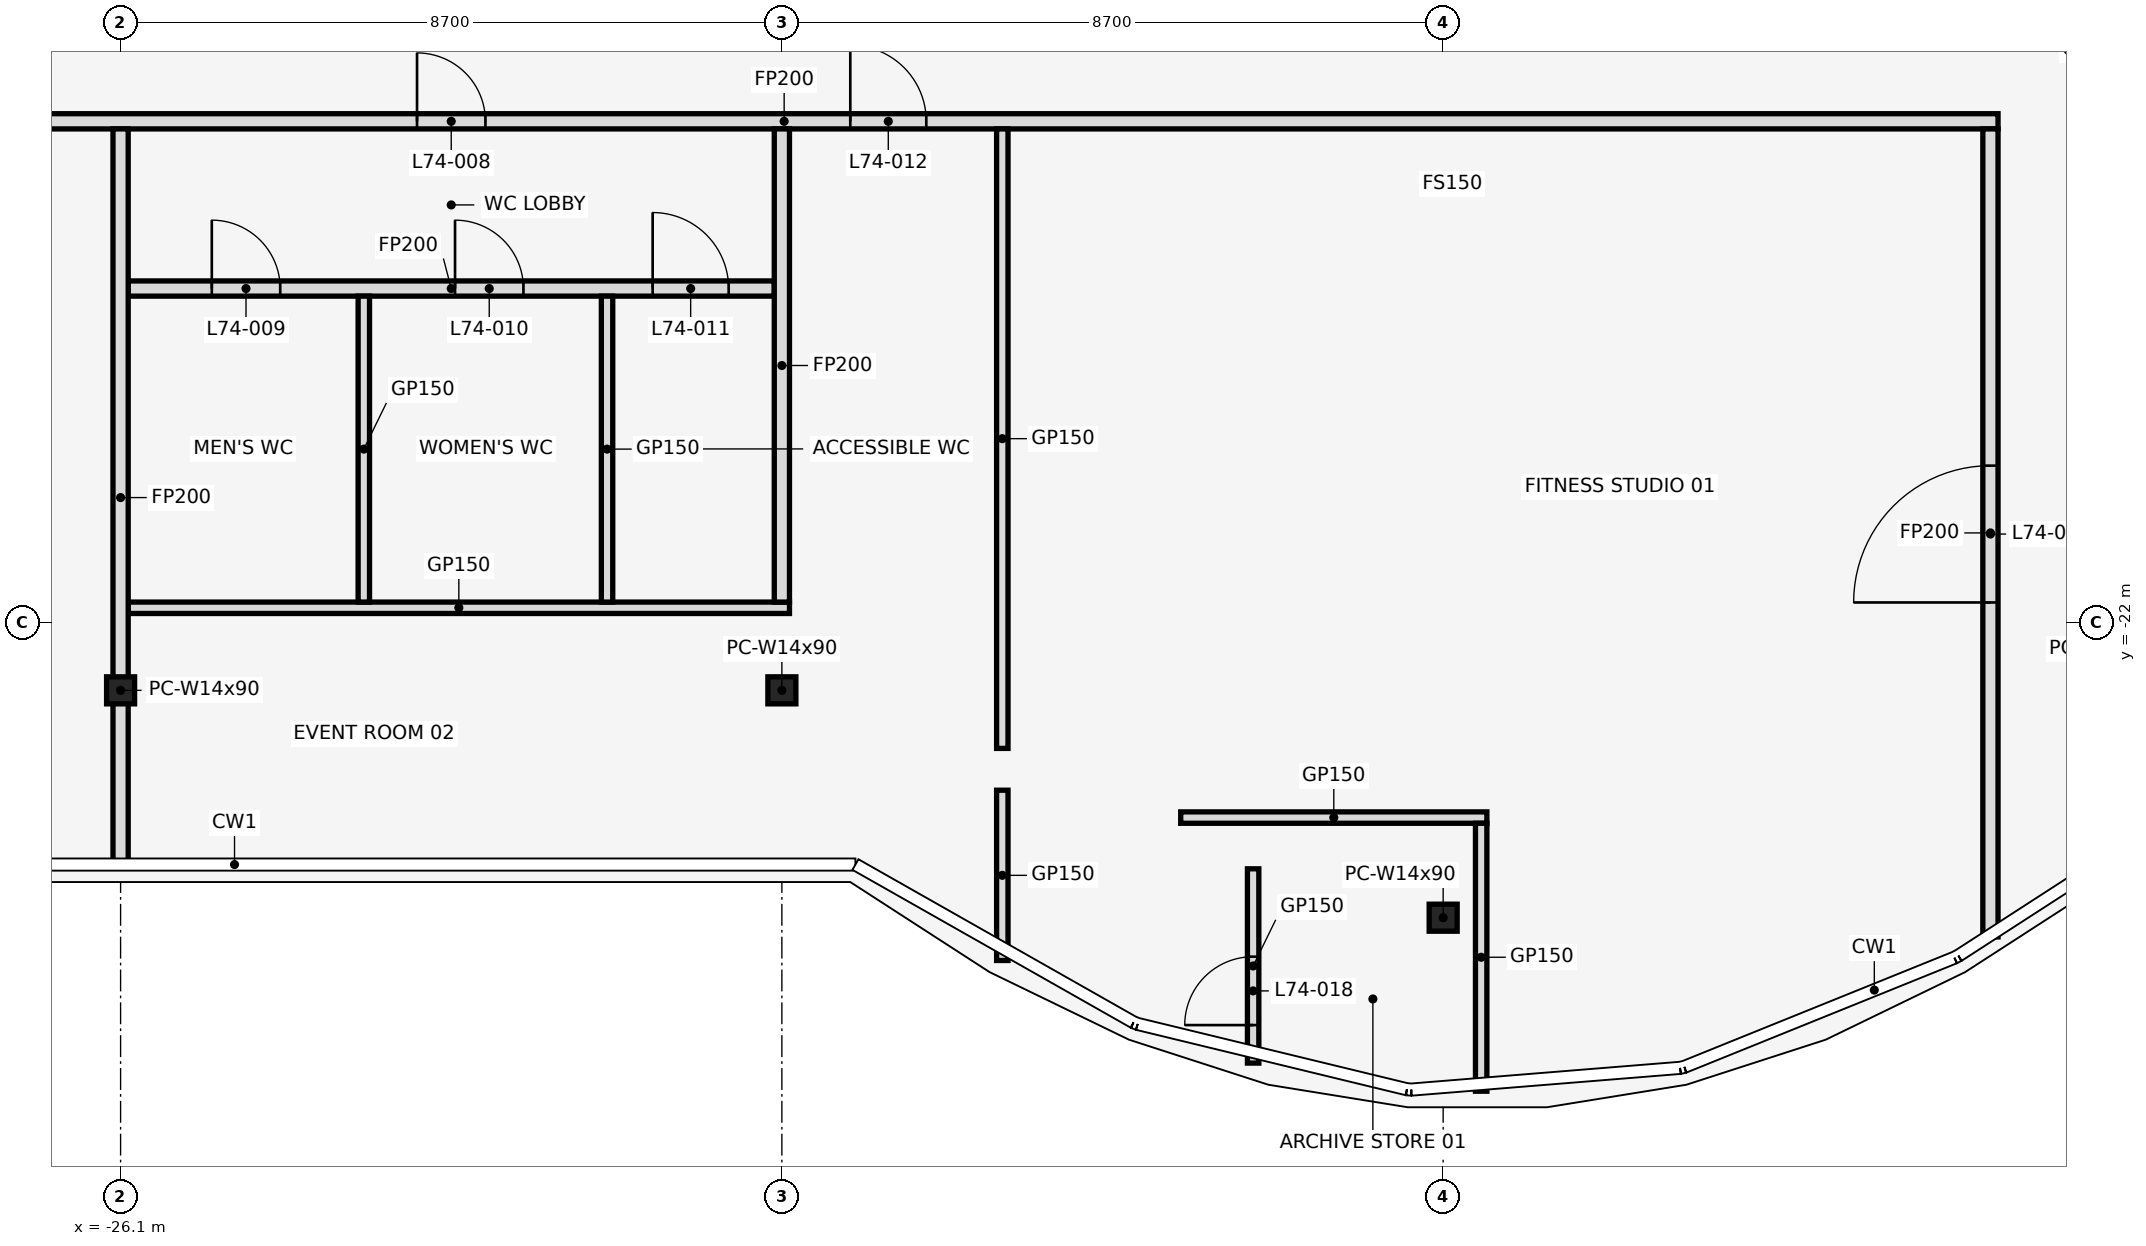
"""IFC4 building model, lengths in metres.
Left out: names, types, materials, properties, quantities, classifications, styles, units other than length and angle.
Written with IfcOpenShell. Run it as: python <this file> out.ifc"""

import sys

from ifc_helpers import new_model, si_unit, direction, frame, frame_2d, origin, origin_2d, place, context, subcontext, project, spatial, rectangle, i_section, extrude, element, fill, save


model = new_model("IFC4")
c1 = context("Model", 3, precision=1e-05, world=origin(), true_north=direction((0.0, 1.0)))
c2 = subcontext(c1, "Body", "Model", "MODEL_VIEW")
j1 = project(units=[si_unit("LENGTHUNIT", "METRE"), si_unit("PLANEANGLEUNIT", "RADIAN")], contexts=[c1])
p1 = place(None, origin())
s1 = spatial("IfcSite", under=j1, at=p1, CompositionType="ELEMENT")
p2 = place(p1, origin())
s2 = spatial("IfcBuilding", under=s1, at=p2, CompositionType="ELEMENT")
p3 = place(p2, frame((0.0, 0.0, 329.0)))
s3 = spatial("IfcBuildingStorey", under=s2, at=p3, CompositionType="ELEMENT", Elevation=329.0)
for number, where, z_axis, x_axis in (
    (1, (-26.1, -22.886, 0.0), (0.0, 0.0, 1.0), (1.0, 0.0, 0.0)),
    (2, (-17.4, -22.886, 0.0), (0.0, 0.0, 1.0), (1.0, 0.0, 0.0)),
    (3, (-8.7, -25.877, 0.0), (0.0, 0.0, 1.0), (1.0, 0.0, 0.0)),
):
    element("IfcColumn", number, at=place(p3, frame(where, z_axis=z_axis, x_axis=x_axis)), inside=s3, PredefinedType="COLUMN", context=c2, shape_type="SweptSolid", body=[
        extrude(i_section(OverallWidth=0.368, OverallDepth=0.356, WebThickness=0.011, FlangeThickness=0.018, at=origin_2d()), origin(), (0.0, 0.0, 1.0), 4.5),
    ])
p4 = place(p3, frame((-12.153, -24.56, 0.0), z_axis=(0.0, 0.0, 1.0), x_axis=(1.0, 0.0, 0.0)))
e4 = element("IfcWall", 4, at=p4, inside=s3, PredefinedType="PARTITIONING", context=c2, shape_type="SweptSolid", body=[
    extrude(rectangle(XDim=4.028, YDim=0.15, at=frame_2d((2.014, 0.0))), origin(), (0.0, 0.0, 1.0), 3.418),
])
p5 = place(p3, frame((-26.0, -21.8, 0.0), z_axis=(0.0, 0.0, 1.0), x_axis=(1.0, 0.0, 0.0)))
e5 = element("IfcWall", 5, at=p5, inside=s3, PredefinedType="PARTITIONING", context=c2, shape_type="SweptSolid", body=[
    extrude(rectangle(XDim=8.7, YDim=0.15, at=frame_2d((4.35, 0.0))), origin(), (0.0, 0.0, 1.0), 3.418),
])
p6 = place(p3, frame((-26.0, -17.6, 0.0), z_axis=(0.0, 0.0, 1.0), x_axis=(1.0, 0.0, 0.0)))
e6 = element("IfcWall", 6, at=p6, inside=s3, PredefinedType="PARTITIONING", context=c2, shape_type="SweptSolid", body=[
    extrude(rectangle(XDim=8.5, YDim=0.2, at=frame_2d((4.25, 0.0))), origin(), (0.0, 0.0, 1.0), 3.418),
])
p7 = place(p6, frame((1.1, 0.0, 0.0)))
e7 = element("IfcOpeningElement", 7, at=p7, cuts=e6, PredefinedType="OPENING", context=c2, shape_type="SweptSolid", body=[
    extrude(rectangle(XDim=0.9, YDim=2.1, at=frame_2d((0.45, 1.05))), frame((0.0, 0.112, 0.0), z_axis=(0.0, -1.0, 0.0), x_axis=(1.0, 0.0, 0.0)), (0.0, 0.0, 1.0), 0.224),
])
p8 = place(p6, frame((4.3, 0.0, 0.0)))
e8 = element("IfcOpeningElement", 8, at=p8, cuts=e6, PredefinedType="OPENING", context=c2, shape_type="SweptSolid", body=[
    extrude(rectangle(XDim=0.9, YDim=2.1, at=frame_2d((0.45, 1.05))), frame((0.0, 0.112, 0.0), z_axis=(0.0, -1.0, 0.0), x_axis=(1.0, 0.0, 0.0)), (0.0, 0.0, 1.0), 0.224),
])
p9 = place(p6, frame((6.9, 0.0, 0.0)))
e9 = element("IfcOpeningElement", 9, at=p9, cuts=e6, PredefinedType="OPENING", context=c2, shape_type="SweptSolid", body=[
    extrude(rectangle(XDim=1.0, YDim=2.1, at=frame_2d((0.5, 1.05))), frame((0.0, 0.112, 0.0), z_axis=(0.0, -1.0, 0.0), x_axis=(1.0, 0.0, 0.0)), (0.0, 0.0, 1.0), 0.224),
])
p10 = place(p3, frame((-33.34, -15.4, 0.0), z_axis=(0.0, 0.0, 1.0), x_axis=(1.0, 0.0, 0.0)))
e10 = element("IfcWall", 10, at=p10, inside=s3, PredefinedType="PARTITIONING", context=c2, shape_type="SweptSolid", body=[
    extrude(rectangle(XDim=31.94, YDim=0.2, at=frame_2d((15.97, 0.0))), origin(), (0.0, 0.0, 1.0), 3.418),
])
p11 = place(p10, frame((3.1, 0.0, 0.0)))
e11 = element("IfcOpeningElement", 11, at=p11, cuts=e10, PredefinedType="OPENING", context=c2, shape_type="SweptSolid", body=[
    extrude(rectangle(XDim=1.0, YDim=2.1, at=frame_2d((0.5, 1.05))), frame((0.0, 0.112, 0.0), z_axis=(0.0, -1.0, 0.0), x_axis=(1.0, 0.0, 0.0)), (0.0, 0.0, 1.0), 0.224),
])
p12 = place(p10, frame((11.14, 0.0, 0.0)))
e12 = element("IfcOpeningElement", 12, at=p12, cuts=e10, PredefinedType="OPENING", context=c2, shape_type="SweptSolid", body=[
    extrude(rectangle(XDim=0.9, YDim=2.1, at=frame_2d((0.45, 1.05))), frame((0.0, 0.112, 0.0), z_axis=(0.0, -1.0, 0.0), x_axis=(1.0, 0.0, 0.0)), (0.0, 0.0, 1.0), 0.224),
])
p13 = place(p10, frame((16.84, 0.0, 0.0)))
e13 = element("IfcOpeningElement", 13, at=p13, cuts=e10, PredefinedType="OPENING", context=c2, shape_type="SweptSolid", body=[
    extrude(rectangle(XDim=1.0, YDim=2.1, at=frame_2d((0.5, 1.05))), frame((0.0, 0.112, 0.0), z_axis=(0.0, -1.0, 0.0), x_axis=(1.0, 0.0, 0.0)), (0.0, 0.0, 1.0), 0.224),
])
p14 = place(p3, frame((-26.1, -25.2, 0.0), z_axis=(0.0, 0.0, 1.0), x_axis=(0.0, 1.0, 0.0)))
e14 = element("IfcWall", 14, at=p14, inside=s3, PredefinedType="PARTITIONING", context=c2, shape_type="SweptSolid", body=[
    extrude(rectangle(XDim=9.7, YDim=0.2, at=frame_2d((4.85, 0.0))), origin(), (0.0, 0.0, 1.0), 3.418),
])
for number, where, z_axis, x_axis in (
    (15, (-22.9, -21.725, 0.0), (0.0, 0.0, 1.0), (0.0, 1.0, 0.0)),
    (16, (-19.7, -21.725, 0.0), (0.0, 0.0, 1.0), (0.0, 1.0, 0.0)),
):
    element("IfcWall", number, at=place(p3, frame(where, z_axis=z_axis, x_axis=x_axis)), inside=s3, PredefinedType="PARTITIONING", context=c2, shape_type="SweptSolid", body=[
        extrude(rectangle(XDim=4.025, YDim=0.15, at=frame_2d((2.013, 0.0))), origin(), (0.0, 0.0, 1.0), 3.418),
    ])
p15 = place(p3, frame((-17.4, -21.725, 0.0), z_axis=(0.0, 0.0, 1.0), x_axis=(0.0, 1.0, 0.0)))
e17 = element("IfcWall", 17, at=p15, inside=s3, PredefinedType="PARTITIONING", context=c2, shape_type="SweptSolid", body=[
    extrude(rectangle(XDim=6.225, YDim=0.2, at=frame_2d((3.113, 0.0))), origin(), (0.0, 0.0, 1.0), 3.418),
])
p16 = place(p3, frame((-14.5, -26.44, 0.0), z_axis=(0.0, 0.0, 1.0), x_axis=(0.0, 1.0, 0.0)))
e18 = element("IfcWall", 18, at=p16, inside=s3, PredefinedType="PARTITIONING", context=c2, shape_type="SweptSolid", body=[
    extrude(rectangle(XDim=2.24, YDim=0.15, at=frame_2d((1.12, 0.0))), origin(), (0.0, 0.0, 1.0), 3.418),
])
p17 = place(p3, frame((-14.5, -23.65, 0.0), z_axis=(0.0, 0.0, 1.0), x_axis=(0.0, 1.0, 0.0)))
e19 = element("IfcWall", 19, at=p17, inside=s3, PredefinedType="PARTITIONING", context=c2, shape_type="SweptSolid", body=[
    extrude(rectangle(XDim=8.15, YDim=0.15, at=frame_2d((4.075, 0.0))), origin(), (0.0, 0.0, 1.0), 3.418),
])
p18 = place(p3, frame((-11.2, -27.79, 0.0), z_axis=(0.0, 0.0, 1.0), x_axis=(0.0, 1.0, 0.0)))
e20 = element("IfcWall", 20, at=p18, inside=s3, PredefinedType="PARTITIONING", context=c2, shape_type="SweptSolid", body=[
    extrude(rectangle(XDim=2.556, YDim=0.15, at=frame_2d((1.278, 0.0))), origin(), (0.0, 0.0, 1.0), 3.418),
])
p19 = place(p18, frame((0.5, 0.0, 0.0)))
e21 = element("IfcOpeningElement", 21, at=p19, cuts=e20, PredefinedType="OPENING", context=c2, shape_type="SweptSolid", body=[
    extrude(rectangle(XDim=0.9, YDim=2.1, at=frame_2d((0.45, 1.05))), frame((0.0, 0.087, 0.0), z_axis=(0.0, -1.0, 0.0), x_axis=(1.0, 0.0, 0.0)), (0.0, 0.0, 1.0), 0.174),
])
p20 = place(p3, frame((-8.2, -28.16, 0.0), z_axis=(0.0, 0.0, 1.0), x_axis=(0.0, 1.0, 0.0)))
e22 = element("IfcWall", 22, at=p20, inside=s3, PredefinedType="PARTITIONING", context=c2, shape_type="SweptSolid", body=[
    extrude(rectangle(XDim=3.525, YDim=0.15, at=frame_2d((1.762, 0.0))), origin(), (0.0, 0.0, 1.0), 3.418),
])
p21 = place(p3, frame((-1.5, -26.13, 0.0), z_axis=(0.0, 0.0, 1.0), x_axis=(0.0, 1.0, 0.0)))
e23 = element("IfcWall", 23, at=p21, inside=s3, PredefinedType="PARTITIONING", context=c2, shape_type="SweptSolid", body=[
    extrude(rectangle(XDim=10.63, YDim=0.2, at=frame_2d((5.315, 0.0))), origin(), (0.0, 0.0, 1.0), 3.418),
])
p22 = place(p21, frame((4.4, 0.0, 0.0)))
e24 = element("IfcOpeningElement", 24, at=p22, cuts=e23, PredefinedType="OPENING", context=c2, shape_type="SweptSolid", body=[
    extrude(rectangle(XDim=1.8, YDim=2.1, at=frame_2d((0.9, 1.05))), frame((0.0, 0.112, 0.0), z_axis=(0.0, -1.0, 0.0), x_axis=(1.0, 0.0, 0.0)), (0.0, 0.0, 1.0), 0.224),
])
p23 = place(p12, frame((0.9, 0.0, 0.0), z_axis=(0.0, 0.0, 1.0), x_axis=(-1.0, 0.0, 0.0)))
e25 = element("IfcDoor", 25, at=p23, inside=s3, OperationType="SINGLE_SWING_RIGHT", PredefinedType="DOOR", context=c2, shape_type="SweptSolid", body=[
    extrude(rectangle(XDim=0.9, YDim=2.1, at=frame_2d((0.45, 1.05))), frame((0.0, 0.025, 0.0), z_axis=(0.0, -1.0, 0.0), x_axis=(1.0, 0.0, 0.0)), (0.0, 0.0, 1.0), 0.05),
])
fill(e12, e25)
p24 = place(p7, frame((0.9, 0.0, 0.0), z_axis=(0.0, 0.0, 1.0), x_axis=(-1.0, 0.0, 0.0)))
e26 = element("IfcDoor", 26, at=p24, inside=s3, OperationType="SINGLE_SWING_RIGHT", PredefinedType="DOOR", context=c2, shape_type="SweptSolid", body=[
    extrude(rectangle(XDim=0.9, YDim=2.1, at=frame_2d((0.45, 1.05))), frame((0.0, 0.025, 0.0), z_axis=(0.0, -1.0, 0.0), x_axis=(1.0, 0.0, 0.0)), (0.0, 0.0, 1.0), 0.05),
])
fill(e7, e26)
p25 = place(p8, frame((0.9, 0.0, 0.0), z_axis=(0.0, 0.0, 1.0), x_axis=(-1.0, 0.0, 0.0)))
e27 = element("IfcDoor", 27, at=p25, inside=s3, OperationType="SINGLE_SWING_LEFT", PredefinedType="DOOR", context=c2, shape_type="SweptSolid", body=[
    extrude(rectangle(XDim=0.9, YDim=2.1, at=frame_2d((0.45, 1.05))), frame((0.0, 0.025, 0.0), z_axis=(0.0, -1.0, 0.0), x_axis=(1.0, 0.0, 0.0)), (0.0, 0.0, 1.0), 0.05),
])
fill(e8, e27)
p26 = place(p9, frame((1.0, 0.0, 0.0), z_axis=(0.0, 0.0, 1.0), x_axis=(-1.0, 0.0, 0.0)))
e28 = element("IfcDoor", 28, at=p26, inside=s3, OperationType="SINGLE_SWING_RIGHT", PredefinedType="DOOR", context=c2, shape_type="SweptSolid", body=[
    extrude(rectangle(XDim=1.0, YDim=2.1, at=frame_2d((0.5, 1.05))), frame((0.0, 0.025, 0.0), z_axis=(0.0, -1.0, 0.0), x_axis=(1.0, 0.0, 0.0)), (0.0, 0.0, 1.0), 0.05),
])
fill(e9, e28)
p27 = place(p13, frame((1.0, 0.0, 0.0), z_axis=(0.0, 0.0, 1.0), x_axis=(-1.0, 0.0, 0.0)))
e29 = element("IfcDoor", 29, at=p27, inside=s3, OperationType="SINGLE_SWING_RIGHT", PredefinedType="DOOR", context=c2, shape_type="SweptSolid", body=[
    extrude(rectangle(XDim=1.0, YDim=2.1, at=frame_2d((0.5, 1.05))), frame((0.0, 0.025, 0.0), z_axis=(0.0, -1.0, 0.0), x_axis=(1.0, 0.0, 0.0)), (0.0, 0.0, 1.0), 0.05),
])
fill(e13, e29)
p28 = place(p22, origin())
e30 = element("IfcDoor", 30, at=p28, inside=s3, OperationType="SINGLE_SWING_LEFT", PredefinedType="DOOR", context=c2, shape_type="SweptSolid", body=[
    extrude(rectangle(XDim=1.8, YDim=2.1, at=frame_2d((0.9, 1.05))), frame((0.0, 0.025, 0.0), z_axis=(0.0, -1.0, 0.0), x_axis=(1.0, 0.0, 0.0)), (0.0, 0.0, 1.0), 0.05),
])
fill(e24, e30)
p29 = place(p19, frame((0.9, 0.0, 0.0), z_axis=(0.0, 0.0, 1.0), x_axis=(-1.0, 0.0, 0.0)))
e31 = element("IfcDoor", 31, at=p29, inside=s3, OperationType="SINGLE_SWING_RIGHT", PredefinedType="DOOR", context=c2, shape_type="SweptSolid", body=[
    extrude(rectangle(XDim=0.9, YDim=2.1, at=frame_2d((0.45, 1.05))), frame((0.0, 0.025, 0.0), z_axis=(0.0, -1.0, 0.0), x_axis=(1.0, 0.0, 0.0)), (0.0, 0.0, 1.0), 0.05),
])
fill(e21, e31)
save(model, sys.argv[1])
